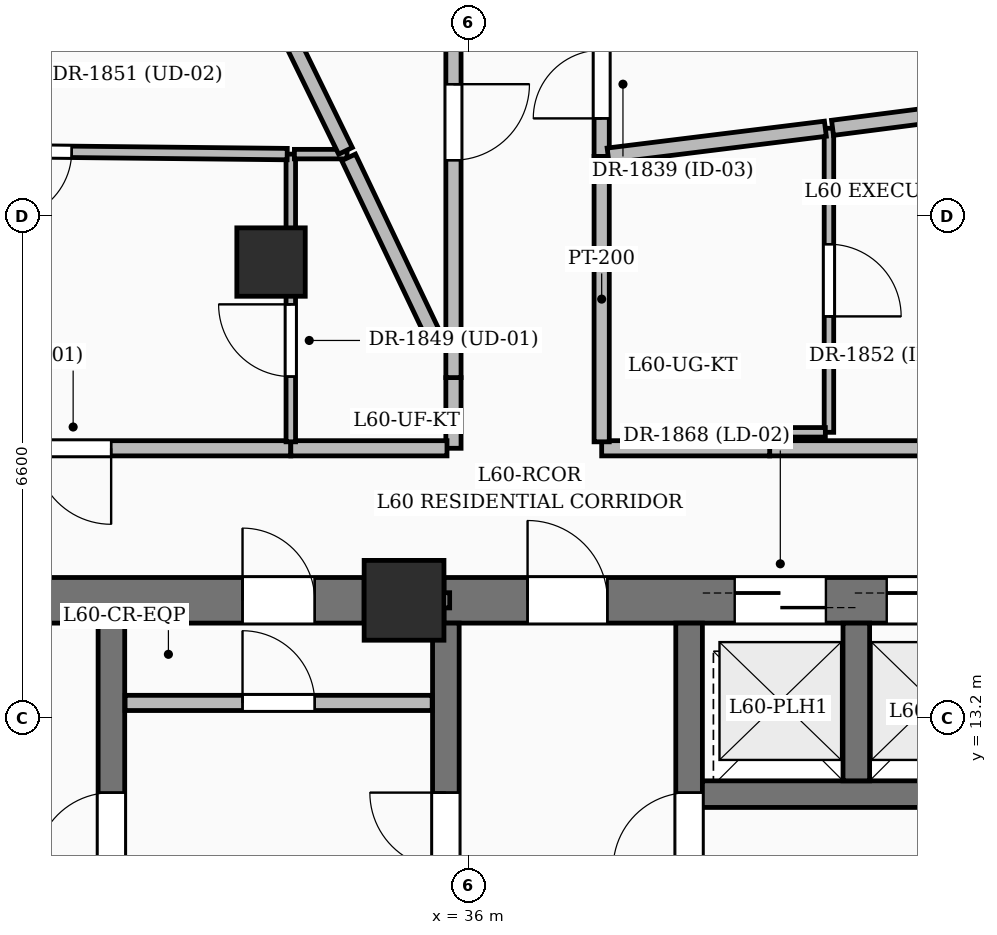
"""IFC4 building model, lengths in metres.
Left out: names, types, materials, properties, quantities, classifications, styles, units other than length and angle.
Written with IfcOpenShell. Run it as: python <this file> out.ifc"""

import sys

from ifc_helpers import new_model, si_unit, direction, frame, frame_2d, origin, origin_2d, place, context, subcontext, project, spatial, rectangle, extrude, element, fill, save


model = new_model("IFC4")
c1 = context("Model", 3, precision=1e-05, world=origin(), true_north=direction((0.0, 1.0)))
c2 = subcontext(c1, "Body", "Model", "MODEL_VIEW")
j1 = project(units=[si_unit("LENGTHUNIT", "METRE"), si_unit("PLANEANGLEUNIT", "RADIAN")], contexts=[c1])
p1 = place(None, origin())
s1 = spatial("IfcSite", under=j1, at=p1, CompositionType="ELEMENT")
p2 = place(p1, origin())
s2 = spatial("IfcBuilding", under=s1, at=p2, CompositionType="ELEMENT")
p3 = place(p2, frame((0.0, 0.0, 233.25)))
s3 = spatial("IfcBuildingStorey", under=s2, at=p3, CompositionType="ELEMENT", Elevation=233.25)
p4 = place(p3, frame((35.15, 14.75, 0.0), z_axis=(0.0, 0.0, 1.0), x_axis=(1.0, 0.0, 0.0)))
e1 = element("IfcColumn", 1, at=p4, inside=s3, PredefinedType="COLUMN", context=c2, shape_type="SweptSolid", body=[
    extrude(rectangle(XDim=1.05, YDim=1.05, at=origin_2d()), origin(), (0.0, 0.0, 1.0), 3.75),
])
p5 = place(p3, frame((33.4, 19.2, 0.0), z_axis=(0.0, 0.0, 1.0), x_axis=(1.0, 0.0, 0.0)))
e2 = element("IfcColumn", 2, at=p5, inside=s3, PredefinedType="COLUMN", context=c2, shape_type="SweptSolid", body=[
    extrude(rectangle(XDim=0.9, YDim=0.9, at=origin_2d()), origin(), (0.0, 0.0, 1.0), 3.75),
])
p6 = place(p3, frame((28.075, 14.75, 0.0), z_axis=(0.0, 0.0, 1.0), x_axis=(1.0, 0.0, 0.0)))
e3 = element("IfcWall", 3, at=p6, inside=s3, PredefinedType="SHEAR", context=c2, shape_type="SweptSolid", body=[
    extrude(rectangle(XDim=6.55, YDim=0.6, at=frame_2d((3.275, 0.0))), origin(), (0.0, 0.0, 1.0), 3.75),
])
p7 = place(p6, frame((1.1, 0.0, 0.0)))
e4 = element("IfcOpeningElement", 4, at=p7, cuts=e3, PredefinedType="OPENING", context=c2, shape_type="SweptSolid", body=[
    extrude(rectangle(XDim=1.05, YDim=2.15, at=frame_2d((0.525, 1.075))), frame((0.0, 0.31, 0.0), z_axis=(0.0, -1.0, 0.0), x_axis=(1.0, 0.0, 0.0)), (0.0, 0.0, 1.0), 0.62),
])
p8 = place(p6, frame((4.95, 0.0, 0.0)))
e5 = element("IfcOpeningElement", 5, at=p8, cuts=e3, PredefinedType="OPENING", context=c2, shape_type="SweptSolid", body=[
    extrude(rectangle(XDim=0.95, YDim=2.15, at=frame_2d((0.475, 1.075))), frame((0.0, 0.31, 0.0), z_axis=(0.0, -1.0, 0.0), x_axis=(1.0, 0.0, 0.0)), (0.0, 0.0, 1.0), 0.62),
])
p9 = place(p3, frame((35.675, 14.75, 0.0), z_axis=(0.0, 0.0, 1.0), x_axis=(1.0, 0.0, 0.0)))
e6 = element("IfcWall", 6, at=p9, inside=s3, PredefinedType="SHEAR", context=c2, shape_type="SweptSolid", body=[
    extrude(rectangle(XDim=10.85, YDim=0.6, at=frame_2d((5.425, 0.0))), origin(), (0.0, 0.0, 1.0), 3.75),
])
p10 = place(p9, frame((1.1, 0.0, 0.0)))
e7 = element("IfcOpeningElement", 7, at=p10, cuts=e6, PredefinedType="OPENING", context=c2, shape_type="SweptSolid", body=[
    extrude(rectangle(XDim=1.05, YDim=2.15, at=frame_2d((0.525, 1.075))), frame((0.0, 0.31, 0.0), z_axis=(0.0, -1.0, 0.0), x_axis=(1.0, 0.0, 0.0)), (0.0, 0.0, 1.0), 0.62),
])
p11 = place(p9, frame((8.7, 0.0, 0.0)))
e8 = element("IfcOpeningElement", 8, at=p11, cuts=e6, PredefinedType="OPENING", context=c2, shape_type="SweptSolid", body=[
    extrude(rectangle(XDim=1.05, YDim=2.15, at=frame_2d((0.525, 1.075))), frame((0.0, 0.31, 0.0), z_axis=(0.0, -1.0, 0.0), x_axis=(1.0, 0.0, 0.0)), (0.0, 0.0, 1.0), 0.62),
])
p12 = place(p9, frame((3.825, 0.0, 0.0)))
e9 = element("IfcOpeningElement", 9, at=p12, cuts=e6, PredefinedType="OPENING", context=c2, shape_type="SweptSolid", body=[
    extrude(rectangle(XDim=1.2, YDim=2.2, at=frame_2d((0.6, 1.1))), frame((0.0, 0.31, 0.0), z_axis=(0.0, -1.0, 0.0), x_axis=(1.0, 0.0, 0.0)), (0.0, 0.0, 1.0), 0.62),
])
p13 = place(p9, frame((5.825, 0.0, 0.0)))
e10 = element("IfcOpeningElement", 10, at=p13, cuts=e6, PredefinedType="OPENING", context=c2, shape_type="SweptSolid", body=[
    extrude(rectangle(XDim=1.2, YDim=2.2, at=frame_2d((0.6, 1.1))), frame((0.0, 0.31, 0.0), z_axis=(0.0, -1.0, 0.0), x_axis=(1.0, 0.0, 0.0)), (0.0, 0.0, 1.0), 0.62),
])
p14 = place(p3, frame((31.3, 5.2, 0.0), z_axis=(0.0, 0.0, 1.0), x_axis=(0.0, 1.0, 0.0)))
e11 = element("IfcWall", 11, at=p14, inside=s3, PredefinedType="SOLIDWALL", context=c2, shape_type="SweptSolid", body=[
    extrude(rectangle(XDim=9.25, YDim=0.35, at=frame_2d((4.625, 0.0))), origin(), (0.0, 0.0, 1.0), 3.75),
])
p15 = place(p14, frame((6.02, 0.0, 0.0)))
e12 = element("IfcOpeningElement", 12, at=p15, cuts=e11, PredefinedType="OPENING", context=c2, shape_type="SweptSolid", body=[
    extrude(rectangle(XDim=1.0, YDim=2.15, at=frame_2d((0.5, 1.075))), frame((0.0, 0.185, 0.0), z_axis=(0.0, -1.0, 0.0), x_axis=(1.0, 0.0, 0.0)), (0.0, 0.0, 1.0), 0.37),
])
p16 = place(p3, frame((35.7, 5.2, 0.0), z_axis=(0.0, 0.0, 1.0), x_axis=(0.0, 1.0, 0.0)))
e13 = element("IfcWall", 13, at=p16, inside=s3, PredefinedType="SOLIDWALL", context=c2, shape_type="SweptSolid", body=[
    extrude(rectangle(XDim=9.25, YDim=0.35, at=frame_2d((4.625, 0.0))), origin(), (0.0, 0.0, 1.0), 3.75),
])
p17 = place(p16, frame((6.02, 0.0, 0.0)))
e14 = element("IfcOpeningElement", 14, at=p17, cuts=e13, PredefinedType="OPENING", context=c2, shape_type="SweptSolid", body=[
    extrude(rectangle(XDim=1.0, YDim=2.15, at=frame_2d((0.5, 1.075))), frame((0.0, 0.185, 0.0), z_axis=(0.0, -1.0, 0.0), x_axis=(1.0, 0.0, 0.0)), (0.0, 0.0, 1.0), 0.37),
])
p18 = place(p3, frame((38.9, 5.2, 0.0), z_axis=(0.0, 0.0, 1.0), x_axis=(0.0, 1.0, 0.0)))
e15 = element("IfcWall", 15, at=p18, inside=s3, PredefinedType="SOLIDWALL", context=c2, shape_type="SweptSolid", body=[
    extrude(rectangle(XDim=9.25, YDim=0.35, at=frame_2d((4.625, 0.0))), origin(), (0.0, 0.0, 1.0), 3.75),
])
p19 = place(p18, frame((6.02, 0.0, 0.0)))
e16 = element("IfcOpeningElement", 16, at=p19, cuts=e15, PredefinedType="OPENING", context=c2, shape_type="SweptSolid", body=[
    extrude(rectangle(XDim=1.0, YDim=2.15, at=frame_2d((0.5, 1.075))), frame((0.0, 0.185, 0.0), z_axis=(0.0, -1.0, 0.0), x_axis=(1.0, 0.0, 0.0)), (0.0, 0.0, 1.0), 0.37),
])
p20 = place(p3, frame((39.075, 12.2, 0.0), z_axis=(0.0, 0.0, 1.0), x_axis=(1.0, 0.0, 0.0)))
e17 = element("IfcWall", 17, at=p20, inside=s3, PredefinedType="SOLIDWALL", context=c2, shape_type="SweptSolid", body=[
    extrude(rectangle(XDim=4.05, YDim=0.35, at=frame_2d((2.025, 0.0))), origin(), (0.0, 0.0, 1.0), 3.75),
])
p21 = place(p3, frame((41.1, 12.375, 0.0), z_axis=(0.0, 0.0, 1.0), x_axis=(0.0, 1.0, 0.0)))
e18 = element("IfcWall", 18, at=p21, inside=s3, PredefinedType="SOLIDWALL", context=c2, shape_type="SweptSolid", body=[
    extrude(rectangle(XDim=2.075, YDim=0.35, at=frame_2d((1.038, 0.0))), origin(), (0.0, 0.0, 1.0), 3.75),
])
p22 = place(p3, frame((34.72, 14.75, 0.0), z_axis=(0.0, 0.0, 1.0), x_axis=(1.0, 0.0, 0.0)))
e19 = element("IfcWall", 19, at=p22, inside=s3, PredefinedType="PARTITIONING", context=c2, shape_type="SweptSolid", body=[
    extrude(rectangle(XDim=1.03, YDim=0.2, at=frame_2d((0.515, 0.0))), origin(), (0.0, 0.0, 1.0), 2.685),
])
p23 = place(p3, frame((31.48, 13.4, 0.0), z_axis=(0.0, 0.0, 1.0), x_axis=(1.0, 0.0, 0.0)))
e20 = element("IfcWall", 20, at=p23, inside=s3, PredefinedType="PARTITIONING", context=c2, shape_type="SweptSolid", body=[
    extrude(rectangle(XDim=4.04, YDim=0.2, at=frame_2d((2.02, 0.0))), origin(), (0.0, 0.0, 1.0), 3.5),
])
p24 = place(p23, frame((1.545, 0.0, 0.0)))
e21 = element("IfcOpeningElement", 21, at=p24, cuts=e20, PredefinedType="OPENING", context=c2, shape_type="SweptSolid", body=[
    extrude(rectangle(XDim=0.95, YDim=2.15, at=frame_2d((0.475, 1.075))), frame((0.0, 0.11, 0.0), z_axis=(0.0, -1.0, 0.0), x_axis=(1.0, 0.0, 0.0)), (0.0, 0.0, 1.0), 0.22),
])
p25 = place(p3, frame((33.66, 16.75, 0.0), z_axis=(0.0, 0.0, 1.0), x_axis=(-1.0, 0.0, 0.0)))
e22 = element("IfcWall", 22, at=p25, inside=s3, PredefinedType="PARTITIONING", context=c2, shape_type="SweptSolid", body=[
    extrude(rectangle(XDim=5.525, YDim=0.2, at=frame_2d((2.762, 0.0))), origin(), (0.0, 0.0, 1.0), 3.5),
])
p26 = place(p25, frame((2.364, 0.0, 0.0)))
e23 = element("IfcOpeningElement", 23, at=p26, cuts=e22, PredefinedType="OPENING", context=c2, shape_type="SweptSolid", body=[
    extrude(rectangle(XDim=1.0, YDim=2.2, at=frame_2d((0.5, 1.1))), frame((0.0, 0.11, 0.0), z_axis=(0.0, -1.0, 0.0), x_axis=(1.0, 0.0, 0.0)), (0.0, 0.0, 1.0), 0.22),
])
p27 = place(p3, frame((35.8, 17.68, 0.0), z_axis=(0.0, 0.0, 1.0), x_axis=(0.0, -1.0, 0.0)))
e24 = element("IfcWall", 24, at=p27, inside=s3, PredefinedType="PARTITIONING", context=c2, shape_type="SweptSolid", body=[
    extrude(rectangle(XDim=0.93, YDim=0.2, at=frame_2d((0.465, 0.0))), origin(), (0.0, 0.0, 1.0), 3.5),
])
p28 = place(p3, frame((35.715, 16.75, 0.0), z_axis=(0.0, 0.0, 1.0), x_axis=(-1.0, 0.0, 0.0)))
e25 = element("IfcWall", 25, at=p28, inside=s3, PredefinedType="PARTITIONING", context=c2, shape_type="SweptSolid", body=[
    extrude(rectangle(XDim=2.055, YDim=0.2, at=frame_2d((1.028, 0.0))), origin(), (0.0, 0.0, 1.0), 2.685),
])
p29 = place(p3, frame((44.98, 16.75, 0.0), z_axis=(0.0, 0.0, 1.0), x_axis=(-1.0, 0.0, 0.0)))
e26 = element("IfcWall", 26, at=p29, inside=s3, PredefinedType="PARTITIONING", context=c2, shape_type="SweptSolid", body=[
    extrude(rectangle(XDim=5.02, YDim=0.2, at=frame_2d((2.51, 0.0))), origin(), (0.0, 0.0, 1.0), 3.5),
])
p30 = place(p29, frame((2.01, 0.0, 0.0)))
e27 = element("IfcOpeningElement", 27, at=p30, cuts=e26, PredefinedType="OPENING", context=c2, shape_type="SweptSolid", body=[
    extrude(rectangle(XDim=1.0, YDim=2.2, at=frame_2d((0.5, 1.1))), frame((0.0, 0.11, 0.0), z_axis=(0.0, -1.0, 0.0), x_axis=(1.0, 0.0, 0.0)), (0.0, 0.0, 1.0), 0.22),
])
p31 = place(p3, frame((39.96, 16.75, 0.0), z_axis=(0.0, 0.0, 1.0), x_axis=(-1.0, 0.0, 0.0)))
e28 = element("IfcWall", 28, at=p31, inside=s3, PredefinedType="PARTITIONING", context=c2, shape_type="SweptSolid", body=[
    extrude(rectangle(XDim=2.21, YDim=0.2, at=frame_2d((1.105, 0.0))), origin(), (0.0, 0.0, 1.0), 3.5),
])
p32 = place(p3, frame((37.75, 16.835, 0.0), z_axis=(0.0, 0.0, 1.0), x_axis=(0.0, 1.0, 0.0)))
e29 = element("IfcWall", 29, at=p32, inside=s3, PredefinedType="PARTITIONING", context=c2, shape_type="SweptSolid", body=[
    extrude(rectangle(XDim=3.755, YDim=0.2, at=frame_2d((1.877, 0.0))), origin(), (0.0, 0.0, 1.0), 3.5),
])
p33 = place(p3, frame((37.75, 20.59, 0.0), z_axis=(0.0, 0.0, 1.0), x_axis=(0.0, 1.0, 0.0)))
e30 = element("IfcWall", 30, at=p33, inside=s3, PredefinedType="PARTITIONING", context=c2, shape_type="SweptSolid", body=[
    extrude(rectangle(XDim=1.9, YDim=0.2, at=frame_2d((0.95, 0.0))), origin(), (0.0, 0.0, 1.0), 3.5),
])
p34 = place(p33, frame((0.5, 0.0, 0.0)))
e31 = element("IfcOpeningElement", 31, at=p34, cuts=e30, PredefinedType="OPENING", context=c2, shape_type="SweptSolid", body=[
    extrude(rectangle(XDim=0.9, YDim=2.1, at=frame_2d((0.45, 1.05))), frame((0.0, 0.11, 0.0), z_axis=(0.0, -1.0, 0.0), x_axis=(1.0, 0.0, 0.0)), (0.0, 0.0, 1.0), 0.22),
])
p35 = place(p3, frame((35.8, 24.315, 0.0), z_axis=(0.0, 0.0, 1.0), x_axis=(0.0, -1.0, 0.0)))
e32 = element("IfcWall", 32, at=p35, inside=s3, PredefinedType="PARTITIONING", context=c2, shape_type="SweptSolid", body=[
    extrude(rectangle(XDim=6.635, YDim=0.2, at=frame_2d((3.317, 0.0))), origin(), (0.0, 0.0, 1.0), 2.685),
])
p36 = place(p35, frame((2.775, 0.0, 0.0)))
e33 = element("IfcOpeningElement", 33, at=p36, cuts=e32, PredefinedType="OPENING", context=c2, shape_type="SweptSolid", body=[
    extrude(rectangle(XDim=1.0, YDim=2.2, at=frame_2d((0.5, 1.1))), frame((0.0, 0.11, 0.0), z_axis=(0.0, -1.0, 0.0), x_axis=(1.0, 0.0, 0.0)), (0.0, 0.0, 1.0), 0.22),
])
p37 = place(p3, frame((33.66, 16.835, 0.0), z_axis=(0.0, 0.0, 1.0), x_axis=(0.0, 1.0, 0.0)))
e34 = element("IfcWall", 34, at=p37, inside=s3, PredefinedType="PARTITIONING", context=c2, shape_type="SweptSolid", body=[
    extrude(rectangle(XDim=3.785, YDim=0.125, at=frame_2d((1.893, 0.0))), origin(), (0.0, 0.0, 1.0), 2.685),
])
p38 = place(p37, frame((0.858, 0.0, 0.0)))
e35 = element("IfcOpeningElement", 35, at=p38, cuts=e34, PredefinedType="OPENING", context=c2, shape_type="SweptSolid", body=[
    extrude(rectangle(XDim=0.95, YDim=2.2, at=frame_2d((0.475, 1.1))), frame((0.0, 0.072, 0.0), z_axis=(0.0, -1.0, 0.0), x_axis=(1.0, 0.0, 0.0)), (0.0, 0.0, 1.0), 0.145),
])
p39 = place(p3, frame((33.613, 20.62, 0.0), z_axis=(0.0, 0.0, 1.0), x_axis=(-0.999945270441, 0.010462128042, 0.0)))
e36 = element("IfcWall", 36, at=p39, inside=s3, PredefinedType="PARTITIONING", context=c2, shape_type="SweptSolid", body=[
    extrude(rectangle(XDim=6.464, YDim=0.15, at=frame_2d((3.232, 0.0))), origin(), (0.0, 0.0, 1.0), 2.685),
])
p40 = place(p39, frame((2.835, 0.0, 0.0)))
e37 = element("IfcOpeningElement", 37, at=p40, cuts=e36, PredefinedType="OPENING", context=c2, shape_type="SweptSolid", body=[
    extrude(rectangle(XDim=0.9, YDim=2.15, at=frame_2d((0.45, 1.075))), frame((0.0, 0.085, 0.0), z_axis=(0.0, -1.0, 0.0), x_axis=(1.0, 0.0, 0.0)), (0.0, 0.0, 1.0), 0.17),
])
p41 = place(p3, frame((34.4, 20.62, 0.0), z_axis=(0.0, 0.0, 1.0), x_axis=(-1.0, 0.0, 0.0)))
e38 = element("IfcWall", 38, at=p41, inside=s3, PredefinedType="PARTITIONING", context=c2, shape_type="SweptSolid", body=[
    extrude(rectangle(XDim=0.692, YDim=0.125, at=frame_2d((0.346, 0.0))), origin(), (0.0, 0.0, 1.0), 2.685),
])
p42 = place(p3, frame((35.6, 18.1, 0.0), z_axis=(0.0, 0.0, 1.0), x_axis=(-0.429975029467, 0.902840780002, 0.0)))
e39 = element("IfcWall", 39, at=p42, inside=s3, PredefinedType="PARTITIONING", context=c2, shape_type="SweptSolid", body=[
    extrude(rectangle(XDim=2.744, YDim=0.2, at=frame_2d((1.372, 0.0))), origin(), (0.0, 0.0, 1.0), 2.685),
])
p43 = place(p3, frame((34.379, 20.663, 0.0), z_axis=(0.0, 0.0, 1.0), x_axis=(-0.438742234656, 0.898612959805, 0.0)))
e40 = element("IfcWall", 40, at=p43, inside=s3, PredefinedType="PARTITIONING", context=c2, shape_type="SweptSolid", body=[
    extrude(rectangle(XDim=4.68, YDim=0.2, at=frame_2d((2.34, 0.0))), origin(), (0.0, 0.0, 1.0), 2.685),
])
p44 = place(p3, frame((40.74, 20.96, 0.0), z_axis=(0.0, 0.0, 1.0), x_axis=(0.0, -1.0, 0.0)))
e41 = element("IfcWall", 41, at=p44, inside=s3, PredefinedType="PARTITIONING", context=c2, shape_type="SweptSolid", body=[
    extrude(rectangle(XDim=4.0, YDim=0.125, at=frame_2d((2.0, 0.0))), origin(), (0.0, 0.0, 1.0), 3.5),
])
p45 = place(p44, frame((1.525, 0.0, 0.0)))
e42 = element("IfcOpeningElement", 42, at=p45, cuts=e41, PredefinedType="OPENING", context=c2, shape_type="SweptSolid", body=[
    extrude(rectangle(XDim=0.95, YDim=2.2, at=frame_2d((0.475, 1.1))), frame((0.0, 0.072, 0.0), z_axis=(0.0, -1.0, 0.0), x_axis=(1.0, 0.0, 0.0)), (0.0, 0.0, 1.0), 0.145),
])
p46 = place(p3, frame((40.692, 16.96, 0.0), z_axis=(0.0, 0.0, 1.0), x_axis=(-1.0, 0.0, 0.0)))
e43 = element("IfcWall", 43, at=p46, inside=s3, PredefinedType="PARTITIONING", context=c2, shape_type="SweptSolid", body=[
    extrude(rectangle(XDim=0.732, YDim=0.125, at=frame_2d((0.366, 0.0))), origin(), (0.0, 0.0, 1.0), 3.5),
])
p47 = place(p3, frame((48.068, 21.904, 0.0), z_axis=(0.0, 0.0, 1.0), x_axis=(-0.991803716191, -0.127770843899, 0.0)))
e44 = element("IfcWall", 44, at=p47, inside=s3, PredefinedType="PARTITIONING", context=c2, shape_type="SweptSolid", body=[
    extrude(rectangle(XDim=7.341, YDim=0.2, at=frame_2d((3.67, 0.0))), origin(), (0.0, 0.0, 1.0), 2.685),
])
p48 = place(p3, frame((40.693, 20.954, 0.0), z_axis=(0.0, 0.0, 1.0), x_axis=(-0.992428411634, -0.122824459212, 0.0)))
e45 = element("IfcWall", 45, at=p48, inside=s3, PredefinedType="PARTITIONING", context=c2, shape_type="SweptSolid", body=[
    extrude(rectangle(XDim=2.88, YDim=0.2, at=frame_2d((1.44, 0.0))), origin(), (0.0, 0.0, 1.0), 3.5),
])
p49 = place(p10, origin())
e46 = element("IfcDoor", 46, at=p49, inside=s3, OperationType="SINGLE_SWING_LEFT", PredefinedType="DOOR", context=c2, shape_type="SweptSolid", body=[
    extrude(rectangle(XDim=1.05, YDim=2.15, at=frame_2d((0.525, 1.075))), frame((0.0, 0.025, 0.0), z_axis=(0.0, -1.0, 0.0), x_axis=(1.0, 0.0, 0.0)), (0.0, 0.0, 1.0), 0.05),
])
fill(e7, e46)
p50 = place(p15, origin())
e47 = element("IfcDoor", 47, at=p50, inside=s3, OperationType="SINGLE_SWING_LEFT", PredefinedType="DOOR", context=c2, shape_type="SweptSolid", body=[
    extrude(rectangle(XDim=1.0, YDim=2.15, at=frame_2d((0.5, 1.075))), frame((0.0, 0.025, 0.0), z_axis=(0.0, -1.0, 0.0), x_axis=(1.0, 0.0, 0.0)), (0.0, 0.0, 1.0), 0.05),
])
fill(e12, e47)
p51 = place(p17, origin())
e48 = element("IfcDoor", 48, at=p51, inside=s3, OperationType="SINGLE_SWING_RIGHT", PredefinedType="DOOR", context=c2, shape_type="SweptSolid", body=[
    extrude(rectangle(XDim=1.0, YDim=2.15, at=frame_2d((0.5, 1.075))), frame((0.0, 0.025, 0.0), z_axis=(0.0, -1.0, 0.0), x_axis=(1.0, 0.0, 0.0)), (0.0, 0.0, 1.0), 0.05),
])
fill(e14, e48)
p52 = place(p19, origin())
e49 = element("IfcDoor", 49, at=p52, inside=s3, OperationType="SINGLE_SWING_LEFT", PredefinedType="DOOR", context=c2, shape_type="SweptSolid", body=[
    extrude(rectangle(XDim=1.0, YDim=2.15, at=frame_2d((0.5, 1.075))), frame((0.0, 0.025, 0.0), z_axis=(0.0, -1.0, 0.0), x_axis=(1.0, 0.0, 0.0)), (0.0, 0.0, 1.0), 0.05),
])
fill(e16, e49)
p53 = place(p12, origin())
e50 = element("IfcDoor", 50, at=p53, inside=s3, OperationType="DOUBLE_DOOR_SLIDING", PredefinedType="DOOR", context=c2, shape_type="SweptSolid", body=[
    extrude(rectangle(XDim=1.2, YDim=2.2, at=frame_2d((0.6, 1.1))), frame((0.0, 0.025, 0.0), z_axis=(0.0, -1.0, 0.0), x_axis=(1.0, 0.0, 0.0)), (0.0, 0.0, 1.0), 0.05),
])
fill(e9, e50)
p54 = place(p13, origin())
e51 = element("IfcDoor", 51, at=p54, inside=s3, OperationType="DOUBLE_DOOR_SLIDING", PredefinedType="DOOR", context=c2, shape_type="SweptSolid", body=[
    extrude(rectangle(XDim=1.2, YDim=2.2, at=frame_2d((0.6, 1.1))), frame((0.0, 0.025, 0.0), z_axis=(0.0, -1.0, 0.0), x_axis=(1.0, 0.0, 0.0)), (0.0, 0.0, 1.0), 0.05),
])
fill(e10, e51)
p55 = place(p24, origin())
e52 = element("IfcDoor", 52, at=p55, inside=s3, OperationType="SINGLE_SWING_LEFT", PredefinedType="DOOR", context=c2, shape_type="SweptSolid", body=[
    extrude(rectangle(XDim=0.95, YDim=2.15, at=frame_2d((0.475, 1.075))), frame((0.0, 0.025, 0.0), z_axis=(0.0, -1.0, 0.0), x_axis=(1.0, 0.0, 0.0)), (0.0, 0.0, 1.0), 0.05),
])
fill(e21, e52)
p56 = place(p8, origin())
e53 = element("IfcDoor", 53, at=p56, inside=s3, OperationType="SINGLE_SWING_LEFT", PredefinedType="DOOR", context=c2, shape_type="SweptSolid", body=[
    extrude(rectangle(XDim=0.95, YDim=2.15, at=frame_2d((0.475, 1.075))), frame((0.0, 0.025, 0.0), z_axis=(0.0, -1.0, 0.0), x_axis=(1.0, 0.0, 0.0)), (0.0, 0.0, 1.0), 0.05),
])
fill(e5, e53)
p57 = place(p34, origin())
e54 = element("IfcDoor", 54, at=p57, inside=s3, OperationType="SINGLE_SWING_LEFT", PredefinedType="DOOR", context=c2, shape_type="SweptSolid", body=[
    extrude(rectangle(XDim=0.9, YDim=2.1, at=frame_2d((0.45, 1.05))), frame((0.0, 0.025, 0.0), z_axis=(0.0, -1.0, 0.0), x_axis=(1.0, 0.0, 0.0)), (0.0, 0.0, 1.0), 0.05),
])
fill(e31, e54)
p58 = place(p26, origin())
e55 = element("IfcDoor", 55, at=p58, inside=s3, OperationType="SINGLE_SWING_LEFT", PredefinedType="DOOR", context=c2, shape_type="SweptSolid", body=[
    extrude(rectangle(XDim=1.0, YDim=2.2, at=frame_2d((0.5, 1.1))), frame((0.0, 0.025, 0.0), z_axis=(0.0, -1.0, 0.0), x_axis=(1.0, 0.0, 0.0)), (0.0, 0.0, 1.0), 0.05),
])
fill(e23, e55)
p59 = place(p38, origin())
e56 = element("IfcDoor", 56, at=p59, inside=s3, OperationType="SINGLE_SWING_RIGHT", PredefinedType="DOOR", context=c2, shape_type="SweptSolid", body=[
    extrude(rectangle(XDim=0.95, YDim=2.2, at=frame_2d((0.475, 1.1))), frame((0.0, 0.025, 0.0), z_axis=(0.0, -1.0, 0.0), x_axis=(1.0, 0.0, 0.0)), (0.0, 0.0, 1.0), 0.05),
])
fill(e35, e56)
p60 = place(p40, origin())
e57 = element("IfcDoor", 57, at=p60, inside=s3, OperationType="SINGLE_SWING_RIGHT", PredefinedType="DOOR", context=c2, shape_type="SweptSolid", body=[
    extrude(rectangle(XDim=0.9, YDim=2.15, at=frame_2d((0.45, 1.075))), frame((0.0, 0.025, 0.0), z_axis=(0.0, -1.0, 0.0), x_axis=(1.0, 0.0, 0.0)), (0.0, 0.0, 1.0), 0.05),
])
fill(e37, e57)
p61 = place(p45, origin())
e58 = element("IfcDoor", 58, at=p61, inside=s3, OperationType="SINGLE_SWING_RIGHT", PredefinedType="DOOR", context=c2, shape_type="SweptSolid", body=[
    extrude(rectangle(XDim=0.95, YDim=2.2, at=frame_2d((0.475, 1.1))), frame((0.0, 0.025, 0.0), z_axis=(0.0, -1.0, 0.0), x_axis=(1.0, 0.0, 0.0)), (0.0, 0.0, 1.0), 0.05),
])
fill(e42, e58)
p62 = place(p36, origin())
e59 = element("IfcDoor", 59, at=p62, inside=s3, OperationType="SINGLE_SWING_LEFT", PredefinedType="DOOR", context=c2, shape_type="SweptSolid", body=[
    extrude(rectangle(XDim=1.0, YDim=2.2, at=frame_2d((0.5, 1.1))), frame((0.0, 0.025, 0.0), z_axis=(0.0, -1.0, 0.0), x_axis=(1.0, 0.0, 0.0)), (0.0, 0.0, 1.0), 0.05),
])
fill(e33, e59)
save(model, sys.argv[1])
